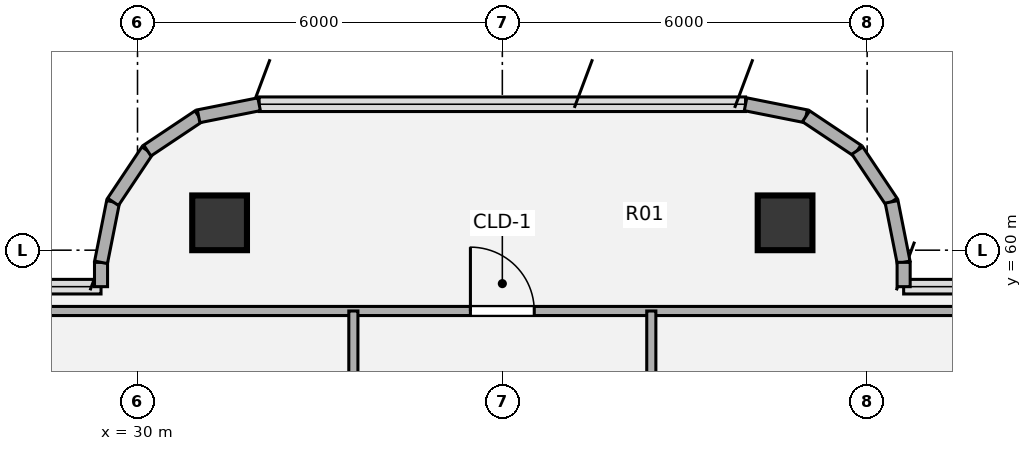
"""IFC4 building model, lengths in metres.
Left out: names, types, materials, properties, quantities, classifications, styles, units other than length and angle.
Written with IfcOpenShell. Run it as: python <this file> out.ifc"""

import sys

from ifc_helpers import new_model, si_unit, direction, frame, frame_2d, origin, origin_2d, place, context, subcontext, project, spatial, rectangle, hollow_circle, extrude, source, transform, mapped, element, fill, save


model = new_model("IFC4")
c1 = context("Model", 3, precision=1e-05, world=origin(), true_north=direction((0.0, 1.0)))
c2 = subcontext(c1, "Body", "Model", "MODEL_VIEW")
j1 = project(units=[si_unit("LENGTHUNIT", "METRE"), si_unit("PLANEANGLEUNIT", "RADIAN")], contexts=[c1])
p1 = place(None, origin())
s1 = spatial("IfcSite", under=j1, at=p1, CompositionType="ELEMENT")
p2 = place(p1, origin())
s2 = spatial("IfcBuilding", under=s1, at=p2, CompositionType="ELEMENT")
p3 = place(p2, frame((0.0, 0.0, 245.7)))
s3 = spatial("IfcBuildingStorey", under=s2, at=p3, CompositionType="ELEMENT", Elevation=245.7)
m1 = source(origin(), c2, "Body", "SweptSolid", [
    extrude(hollow_circle(Radius=0.45, WallThickness=0.032, at=origin_2d()), origin(), (0.0, 0.0, 1.0), 3.78),
])
for number, where, z_axis, x_axis in (
    (1, (31.35, 60.45, 0.0), (0.0, 0.0, 1.0), (1.0, 0.0, 0.0)),
    (2, (40.65, 60.45, 0.0), (0.0, 0.0, 1.0), (1.0, 0.0, 0.0)),
):
    element("IfcColumn", number, at=place(p3, frame(where, z_axis=z_axis, x_axis=x_axis)), inside=s3, PredefinedType="COLUMN", context=c2, shape_type="MappedRepresentation", body=[
        mapped(m1, transform((0.0, 0.0, 0.0), x_axis=(1.0, 0.0, 0.0), y_axis=(0.0, 1.0, 0.0), z_axis=(0.0, 0.0, 1.0), scale=1.0)),
    ])
p4 = place(p3, frame((29.4, 59.4, 0.0), z_axis=(0.0, 0.0, 1.0), x_axis=(0.0, 1.0, 0.0)))
e3 = element("IfcWall", 3, at=p4, inside=s3, PredefinedType="SOLIDWALL", context=c2, shape_type="SweptSolid", body=[
    extrude(rectangle(XDim=0.4, YDim=0.215, at=frame_2d((0.2, 0.0))), origin(), (0.0, 0.0, 1.0), 3.53),
])
p5 = place(p3, frame((29.4, 59.8, 0.0), z_axis=(0.0, 0.0, 1.0), x_axis=(0.195190360752, 0.980765376158, 0.0)))
e4 = element("IfcWall", 4, at=p5, inside=s3, PredefinedType="SOLIDWALL", context=c2, shape_type="SweptSolid", body=[
    extrude(rectangle(XDim=1.014, YDim=0.215, at=frame_2d((0.507, 0.0))), origin(), (0.0, 0.0, 1.0), 3.53),
])
p6 = place(p3, frame((29.598, 60.795, 0.0), z_axis=(0.0, 0.0, 1.0), x_axis=(0.555643898837, 0.831420385657, 0.0)))
e5 = element("IfcWall", 5, at=p6, inside=s3, PredefinedType="SOLIDWALL", context=c2, shape_type="SweptSolid", body=[
    extrude(rectangle(XDim=1.015, YDim=0.215, at=frame_2d((0.507, 0.0))), origin(), (0.0, 0.0, 1.0), 3.53),
])
p7 = place(p3, frame((30.162, 61.638, 0.0), z_axis=(0.0, 0.0, 1.0), x_axis=(0.831346067305, 0.555755086685, 0.0)))
e6 = element("IfcWall", 6, at=p7, inside=s3, PredefinedType="SOLIDWALL", context=c2, shape_type="SweptSolid", body=[
    extrude(rectangle(XDim=1.014, YDim=0.215, at=frame_2d((0.507, 0.0))), origin(), (0.0, 0.0, 1.0), 3.53),
])
for number, where, z_axis, x_axis in (
    (7, (31.005, 62.202, 0.0), (0.0, 0.0, 1.0), (0.981, 0.195, 0.0)),
    (8, (40.0, 62.4, 0.0), (0.0, 0.0, 1.0), (0.981, -0.195, 0.0)),
):
    element("IfcWall", number, at=place(p3, frame(where, z_axis=z_axis, x_axis=x_axis)), inside=s3, PredefinedType="SOLIDWALL", context=c2, shape_type="SweptSolid", body=[
        extrude(rectangle(XDim=1.015, YDim=0.215, at=frame_2d((0.507, 0.0))), origin(), (0.0, 0.0, 1.0), 3.53),
    ])
p8 = place(p3, frame((40.995, 62.202, 0.0), z_axis=(0.0, 0.0, 1.0), x_axis=(0.831346067305, -0.555755086685, 0.0)))
e9 = element("IfcWall", 9, at=p8, inside=s3, PredefinedType="SOLIDWALL", context=c2, shape_type="SweptSolid", body=[
    extrude(rectangle(XDim=1.014, YDim=0.215, at=frame_2d((0.507, 0.0))), origin(), (0.0, 0.0, 1.0), 3.53),
])
p9 = place(p3, frame((41.838, 61.638, 0.0), z_axis=(0.0, 0.0, 1.0), x_axis=(0.555643898837, -0.831420385657, 0.0)))
e10 = element("IfcWall", 10, at=p9, inside=s3, PredefinedType="SOLIDWALL", context=c2, shape_type="SweptSolid", body=[
    extrude(rectangle(XDim=1.015, YDim=0.215, at=frame_2d((0.507, 0.0))), origin(), (0.0, 0.0, 1.0), 3.53),
])
p10 = place(p3, frame((42.402, 60.795, 0.0), z_axis=(0.0, 0.0, 1.0), x_axis=(0.195190360752, -0.980765376158, 0.0)))
e11 = element("IfcWall", 11, at=p10, inside=s3, PredefinedType="SOLIDWALL", context=c2, shape_type="SweptSolid", body=[
    extrude(rectangle(XDim=1.014, YDim=0.215, at=frame_2d((0.507, 0.0))), origin(), (0.0, 0.0, 1.0), 3.53),
])
p11 = place(p3, frame((42.6, 59.8, 0.0), z_axis=(0.0, 0.0, 1.0), x_axis=(0.0, -1.0, 0.0)))
e12 = element("IfcWall", 12, at=p11, inside=s3, PredefinedType="SOLIDWALL", context=c2, shape_type="SweptSolid", body=[
    extrude(rectangle(XDim=0.4, YDim=0.215, at=frame_2d((0.2, 0.0))), origin(), (0.0, 0.0, 1.0), 3.53),
])
p12 = place(p3, frame((27.1, 59.0, 0.0), z_axis=(0.0, 0.0, 1.0), x_axis=(1.0, 0.0, 0.0)))
e13 = element("IfcWall", 13, at=p12, inside=s3, PredefinedType="PARTITIONING", context=c2, shape_type="SweptSolid", body=[
    extrude(rectangle(XDim=17.8, YDim=0.15, at=frame_2d((8.9, 0.0))), origin(), (0.0, 0.0, 1.0), 3.308),
])
p13 = place(p12, frame((8.375, 0.0, 0.0)))
e14 = element("IfcOpeningElement", 14, at=p13, cuts=e13, PredefinedType="OPENING", context=c2, shape_type="SweptSolid", body=[
    extrude(rectangle(XDim=1.05, YDim=2.1, at=origin_2d()), frame((0.525, 0.085, 1.05), z_axis=(0.0, -1.0, 0.0), x_axis=(1.0, 0.0, 0.0)), (0.0, 0.0, 1.0), 0.17),
])
p14 = place(p3, frame((33.55, 48.908, 0.0), z_axis=(0.0, 0.0, 1.0), x_axis=(0.0, 1.0, 0.0)))
e15 = element("IfcWall", 15, at=p14, inside=s3, PredefinedType="PARTITIONING", context=c2, shape_type="SweptSolid", body=[
    extrude(rectangle(XDim=10.092, YDim=0.15, at=frame_2d((5.046, 0.0))), origin(), (0.0, 0.0, 1.0), 3.5),
])
p15 = place(p14, frame((4.521, 0.0, 0.0)))
e16 = element("IfcOpeningElement", 16, at=p15, cuts=e15, PredefinedType="OPENING", context=c2, shape_type="SweptSolid", body=[
    extrude(rectangle(XDim=1.05, YDim=2.1, at=origin_2d()), frame((0.525, 0.085, 1.05), z_axis=(0.0, -1.0, 0.0), x_axis=(1.0, 0.0, 0.0)), (0.0, 0.0, 1.0), 0.17),
])
p16 = place(p3, frame((38.45, 48.908, 0.0), z_axis=(0.0, 0.0, 1.0), x_axis=(0.0, 1.0, 0.0)))
e17 = element("IfcWall", 17, at=p16, inside=s3, PredefinedType="PARTITIONING", context=c2, shape_type="SweptSolid", body=[
    extrude(rectangle(XDim=10.092, YDim=0.15, at=frame_2d((5.046, 0.0))), origin(), (0.0, 0.0, 1.0), 3.5),
])
p17 = place(p16, frame((4.521, 0.0, 0.0)))
e18 = element("IfcOpeningElement", 18, at=p17, cuts=e17, PredefinedType="OPENING", context=c2, shape_type="SweptSolid", body=[
    extrude(rectangle(XDim=1.05, YDim=2.1, at=origin_2d()), frame((0.525, 0.085, 1.05), z_axis=(0.0, -1.0, 0.0), x_axis=(1.0, 0.0, 0.0)), (0.0, 0.0, 1.0), 0.17),
])
m2 = source(origin(), c2, "Body", "SweptSolid", [
    extrude(rectangle(XDim=1.05, YDim=2.1, at=origin_2d()), frame((0.525, 0.025, 1.05), z_axis=(0.0, -1.0, 0.0), x_axis=(1.0, 0.0, 0.0)), (0.0, 0.0, 1.0), 0.05),
])
p18 = place(p13, origin())
e19 = element("IfcDoor", 19, at=p18, inside=s3, OperationType="SINGLE_SWING_LEFT", PredefinedType="DOOR", context=c2, shape_type="MappedRepresentation", body=[
    mapped(m2, transform((0.0, 0.0, 0.0), x_axis=(1.0, 0.0, 0.0), y_axis=(0.0, 1.0, 0.0), z_axis=(0.0, 0.0, 1.0), scale=1.0)),
])
fill(e14, e19)
save(model, sys.argv[1])
